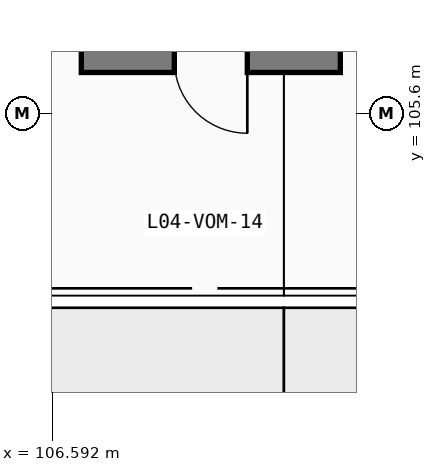
"""IFC4 building model, lengths in metres.
Left out: names, types, materials, properties, quantities, classifications, styles, units other than length and angle.
Written with IfcOpenShell. Run it as: python <this file> out.ifc"""

import sys

from ifc_helpers import new_model, si_unit, direction, frame, frame_2d, origin, place, context, subcontext, project, spatial, rectangle, extrude, element, fill, save


model = new_model("IFC4")
c1 = context("Model", 3, precision=1e-05, world=origin(), true_north=direction((0.0, 1.0)))
c2 = subcontext(c1, "Body", "Model", "MODEL_VIEW")
j1 = project(units=[si_unit("LENGTHUNIT", "METRE"), si_unit("PLANEANGLEUNIT", "RADIAN")], contexts=[c1])
p1 = place(None, origin())
s1 = spatial("IfcSite", under=j1, at=p1, CompositionType="ELEMENT")
p2 = place(p1, origin())
s2 = spatial("IfcBuilding", under=s1, at=p2, CompositionType="ELEMENT")
p3 = place(p2, frame((0.0, 0.0, 18.6)))
s3 = spatial("IfcBuildingStorey", under=s2, at=p3, CompositionType="ELEMENT", Elevation=18.6)
p4 = place(p3, frame((107.07, 106.47, 0.0), z_axis=(0.0, 0.0, 1.0), x_axis=(1.0, 0.0, 0.0)))
e1 = element("IfcWall", 1, at=p4, inside=s3, PredefinedType="SHEAR", context=c2, shape_type="SweptSolid", body=[
    extrude(rectangle(XDim=4.26, YDim=0.4, at=frame_2d((2.13, 0.0))), origin(), (0.0, 0.0, 1.0), 4.24),
])
p5 = place(p4, frame((2.73, 0.0, 0.0), z_axis=(0.0, 0.0, 1.0), x_axis=(-1.0, 0.0, 0.0)))
e2 = element("IfcOpeningElement", 2, at=p5, cuts=e1, PredefinedType="OPENING", context=c2, shape_type="SweptSolid", body=[
    extrude(rectangle(XDim=1.2, YDim=2.2, at=frame_2d((0.6, 1.1))), frame((0.0, 0.21, 0.0), z_axis=(0.0, -1.0, 0.0), x_axis=(1.0, 0.0, 0.0)), (0.0, 0.0, 1.0), 0.42),
])
p6 = place(p5, origin())
e3 = element("IfcDoor", 3, at=p6, inside=s3, OperationType="SINGLE_SWING_LEFT", PredefinedType="DOOR", context=c2, shape_type="SweptSolid", body=[
    extrude(rectangle(XDim=1.2, YDim=2.2, at=frame_2d((0.6, 1.1))), frame((0.0, 0.025, 0.0), z_axis=(0.0, -1.0, 0.0), x_axis=(1.0, 0.0, 0.0)), (0.0, 0.0, 1.0), 0.05),
])
fill(e2, e3)
save(model, sys.argv[1])
